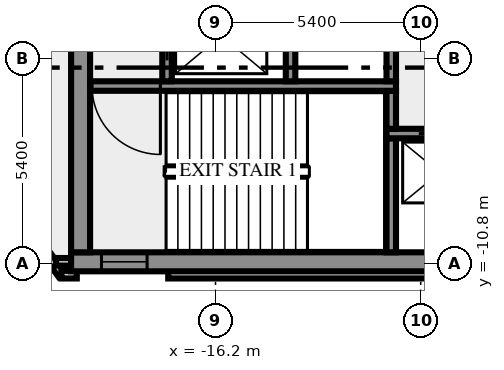
"""IFC4 building model, lengths in metres.
Left out: names, types, materials, properties, quantities, classifications, styles, units other than length and angle.
Written with IfcOpenShell. Run it as: python <this file> out.ifc"""

import sys

from ifc_helpers import new_model, si_unit, direction, frame, frame_2d, origin, place, context, subcontext, project, spatial, rectangle, extrude, element, fill, save


model = new_model("IFC4")
c1 = context("Model", 3, precision=1e-05, world=origin(), true_north=direction((0.0, 1.0)))
c2 = subcontext(c1, "Body", "Model", "MODEL_VIEW")
j1 = project(units=[si_unit("LENGTHUNIT", "METRE"), si_unit("PLANEANGLEUNIT", "RADIAN")], contexts=[c1])
p1 = place(None, origin())
s1 = spatial("IfcSite", under=j1, at=p1, CompositionType="ELEMENT")
p2 = place(p1, origin())
s2 = spatial("IfcBuilding", under=s1, at=p2, CompositionType="ELEMENT")
p3 = place(p2, frame((0.0, 0.0, 31.0)))
s3 = spatial("IfcBuildingStorey", under=s2, at=p3, CompositionType="ELEMENT", Elevation=31.0)
p4 = place(p3, frame((-21.833, -8.909, 0.0), z_axis=(0.0, 0.0, 1.0), x_axis=(0.587766567315, -0.809030569476, 0.0)))
e1 = element("IfcWall", 1, at=p4, inside=s3, PredefinedType="SOLIDWALL", context=c2, shape_type="SweptSolid", body=[
    extrude(rectangle(XDim=2.688, YDim=0.2, at=frame_2d((1.344, 0.0))), origin(), (0.0, 0.0, 1.0), 3.65),
])
p5 = place(p3, frame((-20.256, -11.088, 0.0), z_axis=(0.0, 0.0, 1.0), x_axis=(1.0, 0.0, 0.0)))
e2 = element("IfcWall", 2, at=p5, inside=s3, PredefinedType="SOLIDWALL", context=c2, shape_type="SweptSolid", body=[
    extrude(rectangle(XDim=0.406, YDim=0.2, at=frame_2d((0.203, 0.0))), origin(), (0.0, 0.0, 1.0), 3.65),
])
p6 = place(p3, frame((-17.444, -11.088, 0.0), z_axis=(0.0, 0.0, 1.0), x_axis=(1.0, 0.0, 0.0)))
e3 = element("IfcWall", 3, at=p6, inside=s3, PredefinedType="SOLIDWALL", context=c2, shape_type="SweptSolid", body=[
    extrude(rectangle(XDim=34.888, YDim=0.2, at=frame_2d((17.444, 0.0))), origin(), (0.0, 0.0, 1.0), 3.65),
])
p7 = place(p3, frame((-19.98, -10.75, 0.0), z_axis=(0.0, 0.0, 1.0), x_axis=(-1.0, 0.0, 0.0)))
e4 = element("IfcWall", 4, at=p7, inside=s3, PredefinedType="SOLIDWALL", context=c2, shape_type="SweptSolid", body=[
    extrude(rectangle(XDim=0.417, YDim=0.2, at=frame_2d((0.208, 0.0))), origin(), (0.0, 0.0, 1.0), 3.65),
])
p8 = place(p3, frame((-20.0, -10.75, 0.0), z_axis=(0.0, 0.0, 1.0), x_axis=(1.0, 0.0, 0.0)))
e5 = element("IfcWall", 5, at=p8, inside=s3, PredefinedType="SHEAR", context=c2, shape_type="SweptSolid", body=[
    extrude(rectangle(XDim=40.0, YDim=0.5, at=frame_2d((20.0, 0.0))), origin(), (0.0, 0.0, 1.0), 3.65),
])
p9 = place(p8, frame((0.8, 0.0, 1.0)))
e6 = element("IfcOpeningElement", 6, at=p9, cuts=e5, PredefinedType="OPENING", context=c2, shape_type="SweptSolid", body=[
    extrude(rectangle(XDim=1.2, YDim=1.2, at=frame_2d((0.6, 0.6))), frame((0.0, 0.26, 0.0), z_axis=(0.0, -1.0, 0.0), x_axis=(1.0, 0.0, 0.0)), (0.0, 0.0, 1.0), 0.52),
])
p10 = place(p8, frame((38.0, 0.0, 1.0)))
e7 = element("IfcOpeningElement", 7, at=p10, cuts=e5, PredefinedType="OPENING", context=c2, shape_type="SweptSolid", body=[
    extrude(rectangle(XDim=1.2, YDim=1.2, at=frame_2d((0.6, 0.6))), frame((0.0, 0.26, 0.0), z_axis=(0.0, -1.0, 0.0), x_axis=(1.0, 0.0, 0.0)), (0.0, 0.0, 1.0), 0.52),
])
p11 = place(p3, frame((-19.75, -10.5, 0.0), z_axis=(0.0, 0.0, 1.0), x_axis=(0.0, 1.0, 0.0)))
e8 = element("IfcWall", 8, at=p11, inside=s3, PredefinedType="SHEAR", context=c2, shape_type="SweptSolid", body=[
    extrude(rectangle(XDim=8.8, YDim=0.5, at=frame_2d((4.4, 0.0))), origin(), (0.0, 0.0, 1.0), 3.65),
])
p12 = place(p3, frame((-11.575, -10.5, 0.0), z_axis=(0.0, 0.0, 1.0), x_axis=(0.0, 1.0, 0.0)))
e9 = element("IfcWall", 9, at=p12, inside=s3, PredefinedType="SHEAR", context=c2, shape_type="SweptSolid", body=[
    extrude(rectangle(XDim=3.0, YDim=0.25, at=frame_2d((1.5, 0.0))), origin(), (0.0, 0.0, 1.0), 3.65),
])
p13 = place(p3, frame((11.7, -7.375, 0.0), z_axis=(0.0, 0.0, 1.0), x_axis=(-1.0, 0.0, 0.0)))
e10 = element("IfcWall", 10, at=p13, inside=s3, PredefinedType="SHEAR", context=c2, shape_type="SweptSolid", body=[
    extrude(rectangle(XDim=23.4, YDim=0.25, at=frame_2d((11.7, 0.0))), origin(), (0.0, 0.0, 1.0), 3.65),
])
p14 = place(p13, frame((21.45, 0.0, 0.0)))
e11 = element("IfcOpeningElement", 11, at=p14, cuts=e10, PredefinedType="OPENING", context=c2, shape_type="SweptSolid", body=[
    extrude(rectangle(XDim=1.1, YDim=2.1, at=frame_2d((0.55, 1.05))), frame((0.0, 0.135, 0.0), z_axis=(0.0, -1.0, 0.0), x_axis=(1.0, 0.0, 0.0)), (0.0, 0.0, 1.0), 0.27),
])
p15 = place(p13, frame((18.95, 0.0, 0.0)))
e12 = element("IfcOpeningElement", 12, at=p15, cuts=e10, PredefinedType="OPENING", context=c2, shape_type="SweptSolid", body=[
    extrude(rectangle(XDim=1.1, YDim=2.1, at=frame_2d((0.55, 1.05))), frame((0.0, 0.135, 0.0), z_axis=(0.0, -1.0, 0.0), x_axis=(1.0, 0.0, 0.0)), (0.0, 0.0, 1.0), 0.27),
])
p16 = place(p13, frame((16.45, 0.0, 0.0)))
e13 = element("IfcOpeningElement", 13, at=p16, cuts=e10, PredefinedType="OPENING", context=c2, shape_type="SweptSolid", body=[
    extrude(rectangle(XDim=1.1, YDim=2.1, at=frame_2d((0.55, 1.05))), frame((0.0, 0.135, 0.0), z_axis=(0.0, -1.0, 0.0), x_axis=(1.0, 0.0, 0.0)), (0.0, 0.0, 1.0), 0.27),
])
p17 = place(p13, frame((14.4, 0.0, 0.0)))
e14 = element("IfcOpeningElement", 14, at=p17, cuts=e10, PredefinedType="OPENING", context=c2, shape_type="SweptSolid", body=[
    extrude(rectangle(XDim=0.9, YDim=2.1, at=frame_2d((0.45, 1.05))), frame((0.0, 0.135, 0.0), z_axis=(0.0, -1.0, 0.0), x_axis=(1.0, 0.0, 0.0)), (0.0, 0.0, 1.0), 0.27),
])
p18 = place(p13, frame((12.5, 0.0, 0.0)))
e15 = element("IfcOpeningElement", 15, at=p18, cuts=e10, PredefinedType="OPENING", context=c2, shape_type="SweptSolid", body=[
    extrude(rectangle(XDim=0.9, YDim=2.1, at=frame_2d((0.45, 1.05))), frame((0.0, 0.135, 0.0), z_axis=(0.0, -1.0, 0.0), x_axis=(1.0, 0.0, 0.0)), (0.0, 0.0, 1.0), 0.27),
])
p19 = place(p13, frame((10.6, 0.0, 0.0)))
e16 = element("IfcOpeningElement", 16, at=p19, cuts=e10, PredefinedType="OPENING", context=c2, shape_type="SweptSolid", body=[
    extrude(rectangle(XDim=0.9, YDim=2.1, at=frame_2d((0.45, 1.05))), frame((0.0, 0.135, 0.0), z_axis=(0.0, -1.0, 0.0), x_axis=(1.0, 0.0, 0.0)), (0.0, 0.0, 1.0), 0.27),
])
p20 = place(p3, frame((-11.575, -7.25, 0.0), z_axis=(0.0, 0.0, 1.0), x_axis=(0.0, 1.0, 0.0)))
e17 = element("IfcWall", 17, at=p20, inside=s3, PredefinedType="SHEAR", context=c2, shape_type="SweptSolid", body=[
    extrude(rectangle(XDim=1.0, YDim=0.25, at=frame_2d((0.5, 0.0))), origin(), (0.0, 0.0, 1.0), 3.65),
])
p21 = place(p3, frame((-11.45, -6.125, 0.0), z_axis=(0.0, 0.0, 1.0), x_axis=(-1.0, 0.0, 0.0)))
e18 = element("IfcWall", 18, at=p21, inside=s3, PredefinedType="SHEAR", context=c2, shape_type="SweptSolid", body=[
    extrude(rectangle(XDim=8.05, YDim=0.25, at=frame_2d((4.025, 0.0))), origin(), (0.0, 0.0, 1.0), 3.65),
])
p22 = place(p21, frame((6.2, 0.0, 0.0)))
e19 = element("IfcOpeningElement", 19, at=p22, cuts=e18, PredefinedType="OPENING", context=c2, shape_type="SweptSolid", body=[
    extrude(rectangle(XDim=1.8, YDim=2.1, at=frame_2d((0.9, 1.05))), frame((0.0, 0.135, 0.0), z_axis=(0.0, -1.0, 0.0), x_axis=(1.0, 0.0, 0.0)), (0.0, 0.0, 1.0), 0.27),
])
p23 = place(p3, frame((-17.475, -6.0, 0.0), z_axis=(0.0, 0.0, 1.0), x_axis=(0.0, 1.0, 0.0)))
e20 = element("IfcWall", 20, at=p23, inside=s3, PredefinedType="SHEAR", context=c2, shape_type="SweptSolid", body=[
    extrude(rectangle(XDim=4.3, YDim=0.25, at=frame_2d((2.15, 0.0))), origin(), (0.0, 0.0, 1.0), 3.65),
])
p24 = place(p23, frame((0.55, 0.0, 0.0)))
e21 = element("IfcOpeningElement", 21, at=p24, cuts=e20, PredefinedType="OPENING", context=c2, shape_type="SweptSolid", body=[
    extrude(rectangle(XDim=1.3, YDim=2.1, at=frame_2d((0.65, 1.05))), frame((0.0, 0.135, 0.0), z_axis=(0.0, -1.0, 0.0), x_axis=(1.0, 0.0, 0.0)), (0.0, 0.0, 1.0), 0.27),
])
for number, where, z_axis, x_axis in (
    (22, (-14.225, -6.0, 0.0), (0.0, 0.0, 1.0), (0.0, 1.0, 0.0)),
    (23, (-11.575, -6.0, 0.0), (0.0, 0.0, 1.0), (0.0, 1.0, 0.0)),
):
    element("IfcWall", number, at=place(p3, frame(where, z_axis=z_axis, x_axis=x_axis)), inside=s3, PredefinedType="SHEAR", context=c2, shape_type="SweptSolid", body=[
        extrude(rectangle(XDim=1.75, YDim=0.25, at=frame_2d((0.875, 0.0))), origin(), (0.0, 0.0, 1.0), 3.65),
    ])
p25 = place(p9, origin())
e24 = element("IfcWindow", 24, at=p25, inside=s3, PartitioningType="SINGLE_PANEL", PredefinedType="WINDOW", context=c2, shape_type="SweptSolid", body=[
    extrude(rectangle(XDim=1.2, YDim=1.2, at=frame_2d((0.6, 0.6))), frame((0.0, 0.03, 0.0), z_axis=(0.0, -1.0, 0.0), x_axis=(1.0, 0.0, 0.0)), (0.0, 0.0, 1.0), 0.06),
])
fill(e6, e24)
p26 = place(p14, origin())
e25 = element("IfcDoor", 25, at=p26, inside=s3, OperationType="DOUBLE_DOOR_SLIDING", PredefinedType="DOOR", context=c2, shape_type="SweptSolid", body=[
    extrude(rectangle(XDim=1.1, YDim=2.1, at=frame_2d((0.55, 1.05))), frame((0.0, 0.025, 0.0), z_axis=(0.0, -1.0, 0.0), x_axis=(1.0, 0.0, 0.0)), (0.0, 0.0, 1.0), 0.05),
])
fill(e11, e25)
p27 = place(p22, origin())
e26 = element("IfcDoor", 26, at=p27, inside=s3, OperationType="DOUBLE_DOOR_SINGLE_SWING", PredefinedType="DOOR", context=c2, shape_type="SweptSolid", body=[
    extrude(rectangle(XDim=1.8, YDim=2.1, at=frame_2d((0.9, 1.05))), frame((0.0, 0.025, 0.0), z_axis=(0.0, -1.0, 0.0), x_axis=(1.0, 0.0, 0.0)), (0.0, 0.0, 1.0), 0.05),
])
fill(e19, e26)
p28 = place(p24, origin())
e27 = element("IfcDoor", 27, at=p28, inside=s3, OperationType="DOUBLE_DOOR_SLIDING", PredefinedType="DOOR", context=c2, shape_type="SweptSolid", body=[
    extrude(rectangle(XDim=1.3, YDim=2.1, at=frame_2d((0.65, 1.05))), frame((0.0, 0.025, 0.0), z_axis=(0.0, -1.0, 0.0), x_axis=(1.0, 0.0, 0.0)), (0.0, 0.0, 1.0), 0.05),
])
fill(e21, e27)
save(model, sys.argv[1])
